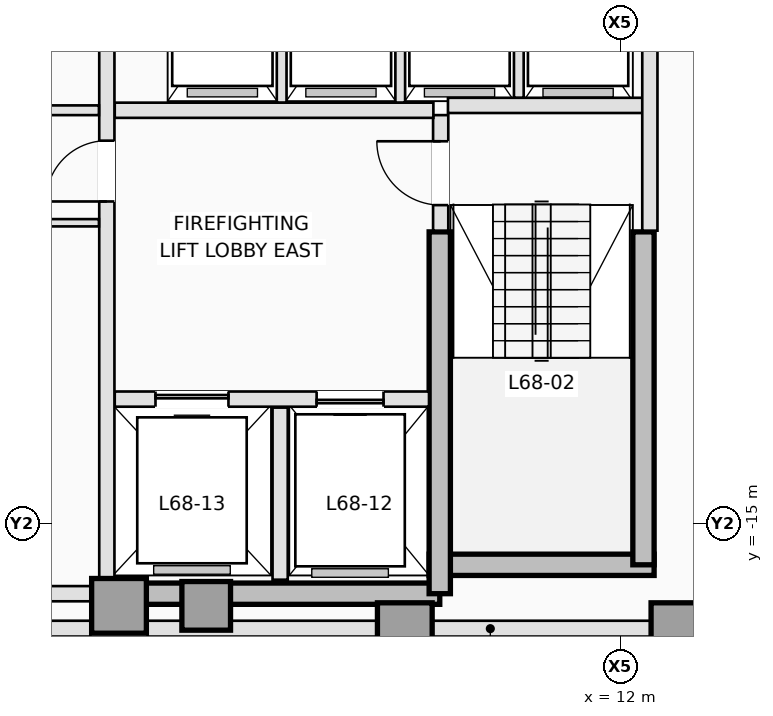
"""IFC4 building model, lengths in metres.
Left out: names, types, materials, properties, quantities, classifications, styles, units other than length and angle.
Written with IfcOpenShell. Run it as: python <this file> out.ifc"""

import sys

from ifc_helpers import new_model, si_unit, direction, frame, frame_2d, origin, origin_2d, place, context, subcontext, project, spatial, rectangle, extrude, element, fill, save


model = new_model("IFC4")
c1 = context("Model", 3, precision=1e-05, world=origin(), true_north=direction((0.0, 1.0)))
c2 = subcontext(c1, "Body", "Model", "MODEL_VIEW")
j1 = project(units=[si_unit("LENGTHUNIT", "METRE"), si_unit("PLANEANGLEUNIT", "RADIAN")], contexts=[c1])
p1 = place(None, origin())
s1 = spatial("IfcSite", under=j1, at=p1, CompositionType="ELEMENT")
p2 = place(p1, origin())
s2 = spatial("IfcBuilding", under=s1, at=p2, CompositionType="ELEMENT")
p3 = place(p2, frame((0.0, 0.0, 246.4)))
s3 = spatial("IfcBuildingStorey", under=s2, at=p3, CompositionType="ELEMENT", Elevation=246.4)
p4 = place(p3, frame((3.75, -16.15, 0.0), z_axis=(0.0, 0.0, 1.0), x_axis=(1.0, 0.0, 0.0)))
e1 = element("IfcWall", 1, at=p4, inside=s3, PredefinedType="SHEAR", context=c2, shape_type="SweptSolid", body=[
    extrude(rectangle(XDim=5.275, YDim=0.35, at=frame_2d((2.637, 0.0))), origin(), (0.0, 0.0, 1.0), 3.5),
])
p5 = place(p3, frame((8.85, -15.675, 0.0), z_axis=(0.0, 0.0, 1.0), x_axis=(1.0, 0.0, 0.0)))
e2 = element("IfcWall", 2, at=p5, inside=s3, PredefinedType="SHEAR", context=c2, shape_type="SweptSolid", body=[
    extrude(rectangle(XDim=3.7, YDim=0.35, at=frame_2d((1.85, 0.0))), origin(), (0.0, 0.0, 1.0), 3.5),
])
p6 = place(p3, frame((12.375, -15.675, 0.0), z_axis=(0.0, 0.0, 1.0), x_axis=(0.0, 1.0, 0.0)))
e3 = element("IfcWall", 3, at=p6, inside=s3, PredefinedType="SHEAR", context=c2, shape_type="SweptSolid", body=[
    extrude(rectangle(XDim=5.475, YDim=0.35, at=frame_2d((2.738, 0.0))), origin(), (0.0, 0.0, 1.0), 3.5),
])
p7 = place(p3, frame((9.025, -16.15, 0.0), z_axis=(0.0, 0.0, 1.0), x_axis=(0.0, 1.0, 0.0)))
e4 = element("IfcWall", 4, at=p7, inside=s3, PredefinedType="SHEAR", context=c2, shape_type="SweptSolid", body=[
    extrude(rectangle(XDim=5.95, YDim=0.35, at=frame_2d((2.975, 0.0))), origin(), (0.0, 0.0, 1.0), 3.5),
])
for number, where, z_axis, x_axis in (
    (5, (3.75, -16.35, 0.0), (0.0, 0.0, 1.0), (1.0, 0.0, 0.0)),
    (6, (8.45, -16.75, 0.0), (0.0, 0.0, 1.0), (1.0, 0.0, 0.0)),
    (7, (12.95, -16.75, 0.0), (0.0, 0.0, 1.0), (1.0, 0.0, 0.0)),
):
    element("IfcColumn", number, at=place(p3, frame(where, z_axis=z_axis, x_axis=x_axis)), inside=s3, PredefinedType="COLUMN", context=c2, shape_type="SweptSolid", body=[
        extrude(rectangle(XDim=0.9, YDim=0.9, at=origin_2d()), origin(), (0.0, 0.0, 1.0), 3.5),
    ])
p8 = place(p3, frame((5.184, -16.35, 0.0), z_axis=(0.0, 0.0, 1.0), x_axis=(0.0, 1.0, 0.0)))
e8 = element("IfcColumn", 8, at=p8, inside=s3, PredefinedType="COLUMN", context=c2, shape_type="SweptSolid", body=[
    extrude(rectangle(XDim=0.8, YDim=0.8, at=origin_2d()), origin(), (0.0, 0.0, 1.0), 3.5),
])
p9 = place(p3, frame((15.493, -16.725, 0.0), z_axis=(0.0, 0.0, 1.0), x_axis=(-1.0, 0.0, 0.0)))
e9 = element("IfcWall", 9, at=p9, inside=s3, PredefinedType="STANDARD", context=c2, shape_type="SweptSolid", body=[
    extrude(rectangle(XDim=11.273, YDim=0.26, at=frame_2d((5.636, 0.0))), origin(), (0.0, 0.0, 1.0), 2.79),
])
p10 = place(p3, frame((3.28, -16.725, 0.0), z_axis=(0.0, 0.0, 1.0), x_axis=(-1.0, 0.0, 0.0)))
e10 = element("IfcWall", 10, at=p10, inside=s3, PredefinedType="STANDARD", context=c2, shape_type="SweptSolid", body=[
    extrude(rectangle(XDim=2.674, YDim=0.26, at=frame_2d((1.337, 0.0))), origin(), (0.0, 0.0, 1.0), 3.25),
])
p11 = place(p3, frame((9.04, -10.18, 0.0), z_axis=(0.0, 0.0, 1.0), x_axis=(0.0, 1.0, 0.0)))
e11 = element("IfcWall", 11, at=p11, inside=s3, PredefinedType="PARTITIONING", context=c2, shape_type="SweptSolid", body=[
    extrude(rectangle(XDim=1.9, YDim=0.25, at=frame_2d((0.95, 0.0))), origin(), (0.0, 0.0, 1.0), 3.25),
])
p12 = place(p11, frame((0.42, 0.0, 0.0)))
e12 = element("IfcOpeningElement", 12, at=p12, cuts=e11, PredefinedType="OPENING", context=c2, shape_type="SweptSolid", body=[
    extrude(rectangle(XDim=1.05, YDim=2.15, at=frame_2d((0.525, 1.075))), frame((0.0, 0.135, 0.0), z_axis=(0.0, -1.0, 0.0), x_axis=(1.0, 0.0, 0.0)), (0.0, 0.0, 1.0), 0.27),
])
p13 = place(p3, frame((9.16, -8.12, 0.0), z_axis=(0.0, 0.0, 1.0), x_axis=(1.0, 0.0, 0.0)))
e13 = element("IfcWall", 13, at=p13, inside=s3, PredefinedType="PARTITIONING", context=c2, shape_type="SweptSolid", body=[
    extrude(rectangle(XDim=3.22, YDim=0.25, at=frame_2d((1.61, 0.0))), origin(), (0.0, 0.0, 1.0), 3.25),
])
p14 = place(p3, frame((12.48, -10.18, 0.0), z_axis=(0.0, 0.0, 1.0), x_axis=(0.0, 1.0, 0.0)))
e14 = element("IfcWall", 14, at=p14, inside=s3, PredefinedType="PARTITIONING", context=c2, shape_type="SweptSolid", body=[
    extrude(rectangle(XDim=4.84, YDim=0.25, at=frame_2d((2.42, 0.0))), origin(), (0.0, 0.0, 1.0), 3.25),
])
p15 = place(p3, frame((3.68, -12.95, 0.0), z_axis=(0.0, 0.0, 1.0), x_axis=(1.0, 0.0, 0.0)))
e15 = element("IfcWall", 15, at=p15, inside=s3, PredefinedType="PARTITIONING", context=c2, shape_type="SweptSolid", body=[
    extrude(rectangle(XDim=5.168, YDim=0.25, at=frame_2d((2.584, 0.0))), origin(), (0.0, 0.0, 1.0), 3.25),
])
p16 = place(p15, frame((3.32, 0.0, 0.0)))
e16 = element("IfcOpeningElement", 16, at=p16, cuts=e15, PredefinedType="OPENING", context=c2, shape_type="SweptSolid", body=[
    extrude(rectangle(XDim=1.1, YDim=2.15, at=frame_2d((0.55, 1.075))), frame((0.0, 0.135, 0.0), z_axis=(0.0, -1.0, 0.0), x_axis=(1.0, 0.0, 0.0)), (0.0, 0.0, 1.0), 0.27),
])
p17 = place(p15, frame((0.67, 0.0, 0.0)))
e17 = element("IfcOpeningElement", 17, at=p17, cuts=e15, PredefinedType="OPENING", context=c2, shape_type="SweptSolid", body=[
    extrude(rectangle(XDim=1.2, YDim=2.15, at=frame_2d((0.6, 1.075))), frame((0.0, 0.135, 0.0), z_axis=(0.0, -1.0, 0.0), x_axis=(1.0, 0.0, 0.0)), (0.0, 0.0, 1.0), 0.27),
])
p18 = place(p3, frame((6.4, -15.92, 0.0), z_axis=(0.0, 0.0, 1.0), x_axis=(0.0, 1.0, 0.0)))
e18 = element("IfcWall", 18, at=p18, inside=s3, PredefinedType="PARTITIONING", context=c2, shape_type="SweptSolid", body=[
    extrude(rectangle(XDim=2.83, YDim=0.25, at=frame_2d((1.415, 0.0))), origin(), (0.0, 0.0, 1.0), 3.25),
])
p19 = place(p3, frame((3.68, -8.2, 0.0), z_axis=(0.0, 0.0, 1.0), x_axis=(1.0, 0.0, 0.0)))
e19 = element("IfcWall", 19, at=p19, inside=s3, PredefinedType="PARTITIONING", context=c2, shape_type="SweptSolid", body=[
    extrude(rectangle(XDim=5.24, YDim=0.25, at=frame_2d((2.62, 0.0))), origin(), (0.0, 0.0, 1.0), 3.25),
])
p20 = place(p3, frame((3.55, -15.898, 0.0), z_axis=(0.0, 0.0, 1.0), x_axis=(0.0, 1.0, 0.0)))
e20 = element("IfcWall", 20, at=p20, inside=s3, PredefinedType="PARTITIONING", context=c2, shape_type="SweptSolid", body=[
    extrude(rectangle(XDim=10.558, YDim=0.25, at=frame_2d((5.279, 0.0))), origin(), (0.0, 0.0, 1.0), 3.25),
])
p21 = place(p20, frame((6.198, 0.0, 0.0)))
e21 = element("IfcOpeningElement", 21, at=p21, cuts=e20, PredefinedType="OPENING", context=c2, shape_type="SweptSolid", body=[
    extrude(rectangle(XDim=1.0, YDim=2.15, at=frame_2d((0.5, 1.075))), frame((0.0, 0.135, 0.0), z_axis=(0.0, -1.0, 0.0), x_axis=(1.0, 0.0, 0.0)), (0.0, 0.0, 1.0), 0.27),
])
for number, where, z_axis, x_axis in (
    (22, (6.425, -8.073, 0.0), (0.0, 0.0, 1.0), (0.0, 1.0, 0.0)),
    (23, (8.375, -8.073, 0.0), (0.0, 0.0, 1.0), (0.0, 1.0, 0.0)),
):
    element("IfcWall", number, at=place(p3, frame(where, z_axis=z_axis, x_axis=x_axis)), inside=s3, PredefinedType="PARTITIONING", context=c2, shape_type="SweptSolid", body=[
        extrude(rectangle(XDim=2.733, YDim=0.16, at=frame_2d((1.366, 0.0))), origin(), (0.0, 0.0, 1.0), 3.25),
    ])
p22 = place(p3, frame((10.325, -7.993, 0.0), z_axis=(0.0, 0.0, 1.0), x_axis=(0.0, 1.0, 0.0)))
e24 = element("IfcWall", 24, at=p22, inside=s3, PredefinedType="PARTITIONING", context=c2, shape_type="SweptSolid", body=[
    extrude(rectangle(XDim=2.653, YDim=0.16, at=frame_2d((1.326, 0.0))), origin(), (0.0, 0.0, 1.0), 3.25),
])
p23 = place(p3, frame((-3.298, -16.15, 0.0), z_axis=(0.0, 0.0, 1.0), x_axis=(1.0, 0.0, 0.0)))
e25 = element("IfcWall", 25, at=p23, inside=s3, PredefinedType="PARTITIONING", context=c2, shape_type="SweptSolid", body=[
    extrude(rectangle(XDim=6.596, YDim=0.25, at=frame_2d((3.298, 0.0))), origin(), (0.0, 0.0, 1.0), 2.844),
])
p24 = place(p3, frame((-3.42, -8.2, 0.0), z_axis=(0.0, 0.0, 1.0), x_axis=(1.0, 0.0, 0.0)))
e26 = element("IfcWall", 26, at=p24, inside=s3, PredefinedType="PARTITIONING", context=c2, shape_type="SweptSolid", body=[
    extrude(rectangle(XDim=6.84, YDim=0.16, at=frame_2d((3.42, 0.0))), origin(), (0.0, 0.0, 1.0), 3.25),
])
p25 = place(p24, frame((2.92, 0.0, 0.0)))
e27 = element("IfcOpeningElement", 27, at=p25, cuts=e26, PredefinedType="OPENING", context=c2, shape_type="SweptSolid", body=[
    extrude(rectangle(XDim=1.0, YDim=2.15, at=frame_2d((0.5, 1.075))), frame((0.0, 0.09, 0.0), z_axis=(0.0, -1.0, 0.0), x_axis=(1.0, 0.0, 0.0)), (0.0, 0.0, 1.0), 0.18),
])
p26 = place(p3, frame((-3.42, -10.05, 0.0), z_axis=(0.0, 0.0, 1.0), x_axis=(1.0, 0.0, 0.0)))
e28 = element("IfcWall", 28, at=p26, inside=s3, PredefinedType="PARTITIONING", context=c2, shape_type="SweptSolid", body=[
    extrude(rectangle(XDim=6.84, YDim=0.12, at=frame_2d((3.42, 0.0))), origin(), (0.0, 0.0, 1.0), 3.25),
])
p27 = place(p26, frame((2.95, 0.0, 0.0)))
e29 = element("IfcOpeningElement", 29, at=p27, cuts=e28, PredefinedType="OPENING", context=c2, shape_type="SweptSolid", body=[
    extrude(rectangle(XDim=0.92, YDim=2.12, at=frame_2d((0.46, 1.06))), frame((0.0, 0.07, 0.0), z_axis=(0.0, -1.0, 0.0), x_axis=(1.0, 0.0, 0.0)), (0.0, 0.0, 1.0), 0.14),
])
p28 = place(p16, origin())
e30 = element("IfcDoor", 30, at=p28, inside=s3, OperationType="SLIDING_TO_RIGHT", PredefinedType="DOOR", context=c2, shape_type="SweptSolid", body=[
    extrude(rectangle(XDim=1.1, YDim=2.15, at=frame_2d((0.55, 1.075))), frame((0.0, 0.025, 0.0), z_axis=(0.0, -1.0, 0.0), x_axis=(1.0, 0.0, 0.0)), (0.0, 0.0, 1.0), 0.05),
])
fill(e16, e30)
p29 = place(p17, origin())
e31 = element("IfcDoor", 31, at=p29, inside=s3, OperationType="SLIDING_TO_LEFT", PredefinedType="DOOR", context=c2, shape_type="SweptSolid", body=[
    extrude(rectangle(XDim=1.2, YDim=2.15, at=frame_2d((0.6, 1.075))), frame((0.0, 0.025, 0.0), z_axis=(0.0, -1.0, 0.0), x_axis=(1.0, 0.0, 0.0)), (0.0, 0.0, 1.0), 0.05),
])
fill(e17, e31)
p30 = place(p12, origin())
e32 = element("IfcDoor", 32, at=p30, inside=s3, OperationType="SINGLE_SWING_RIGHT", PredefinedType="DOOR", context=c2, shape_type="SweptSolid", body=[
    extrude(rectangle(XDim=1.05, YDim=2.15, at=frame_2d((0.525, 1.075))), frame((0.0, 0.025, 0.0), z_axis=(0.0, -1.0, 0.0), x_axis=(1.0, 0.0, 0.0)), (0.0, 0.0, 1.0), 0.05),
])
fill(e12, e32)
p31 = place(p21, origin())
e33 = element("IfcDoor", 33, at=p31, inside=s3, OperationType="SINGLE_SWING_LEFT", PredefinedType="DOOR", context=c2, shape_type="SweptSolid", body=[
    extrude(rectangle(XDim=1.0, YDim=2.15, at=frame_2d((0.5, 1.075))), frame((0.0, 0.025, 0.0), z_axis=(0.0, -1.0, 0.0), x_axis=(1.0, 0.0, 0.0)), (0.0, 0.0, 1.0), 0.05),
])
fill(e21, e33)
save(model, sys.argv[1])
